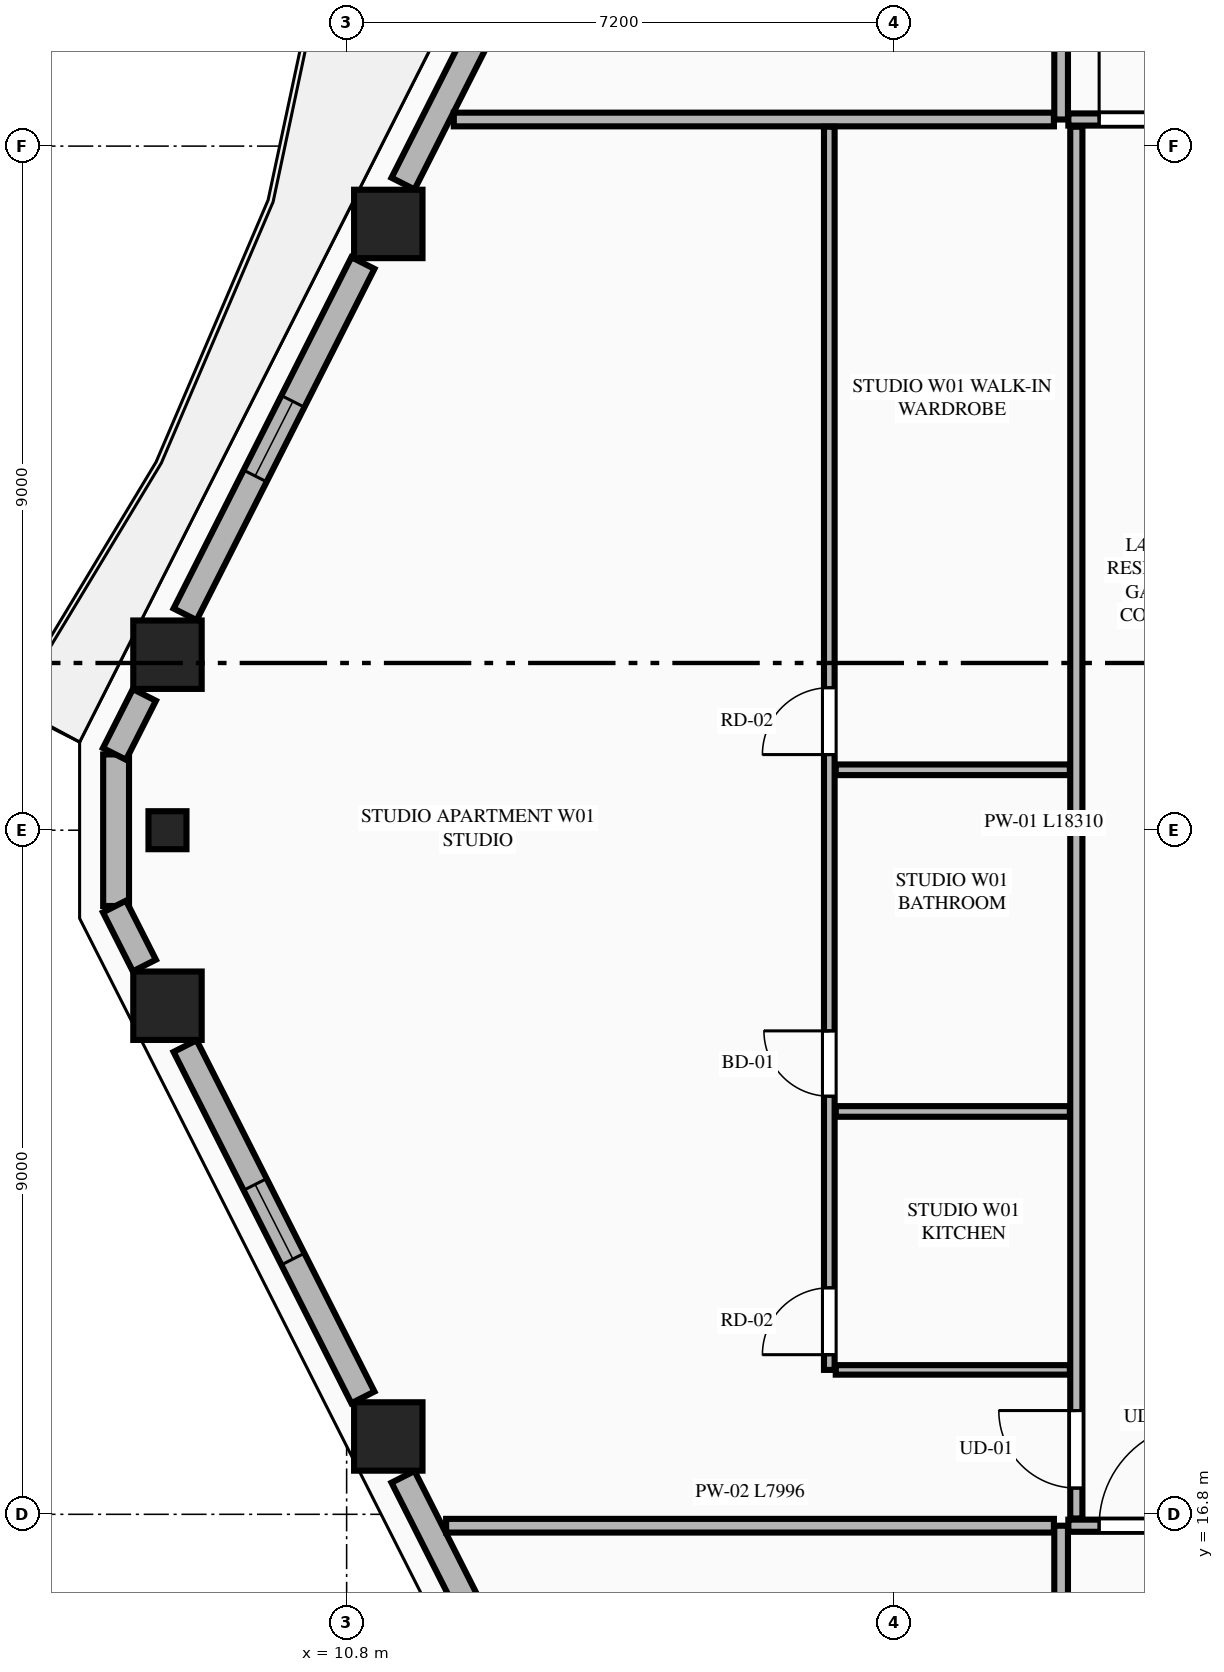
"""IFC4 building model, lengths in metres.
Left out: names, types, materials, properties, quantities, classifications, styles, units other than length and angle.
Written with IfcOpenShell. Run it as: python <this file> out.ifc"""

import sys

from ifc_helpers import new_model, si_unit, direction, frame, frame_2d, origin, origin_2d, place, context, subcontext, project, spatial, rectangle, extrude, element, fill, save


model = new_model("IFC4")
c1 = context("Model", 3, precision=1e-05, world=origin(), true_north=direction((0.0, 1.0)))
c2 = subcontext(c1, "Body", "Model", "MODEL_VIEW")
j1 = project(units=[si_unit("LENGTHUNIT", "METRE"), si_unit("PLANEANGLEUNIT", "RADIAN")], contexts=[c1])
p1 = place(None, origin())
s1 = spatial("IfcSite", under=j1, at=p1, CompositionType="ELEMENT")
p2 = place(p1, origin())
s2 = spatial("IfcBuilding", under=s1, at=p2, CompositionType="ELEMENT")
p3 = place(p2, frame((0.0, 0.0, 164.15)))
s3 = spatial("IfcBuildingStorey", under=s2, at=p3, CompositionType="ELEMENT", Elevation=164.15)
for number, where, z_axis, x_axis in (
    (1, (11.348, 33.776, 0.0), (0.0, 0.0, 1.0), (1.0, 0.0, 0.0)),
    (2, (8.443, 28.109, 0.0), (0.0, 0.0, 1.0), (1.0, 0.0, 0.0)),
    (3, (8.443, 23.491, 0.0), (0.0, 0.0, 1.0), (1.0, 0.0, 0.0)),
    (4, (11.348, 17.824, 0.0), (0.0, 0.0, 1.0), (1.0, 0.0, 0.0)),
):
    element("IfcColumn", number, at=place(p3, frame(where, z_axis=z_axis, x_axis=x_axis)), inside=s3, PredefinedType="COLUMN", context=c2, shape_type="SweptSolid", body=[
        extrude(rectangle(XDim=0.9, YDim=0.9, at=origin_2d()), origin(), (0.0, 0.0, 1.0), 3.55),
    ])
p4 = place(p3, frame((8.443, 25.8, 0.0), z_axis=(0.0, 0.0, 1.0), x_axis=(0.0, -1.0, 0.0)))
e5 = element("IfcColumn", 5, at=p4, inside=s3, PredefinedType="PILASTER", context=c2, shape_type="SweptSolid", body=[
    extrude(rectangle(XDim=0.5, YDim=0.35, at=origin_2d()), origin(), (0.0, 0.0, 1.0), 3.55),
])
p5 = place(p3, frame((7.767, 26.797, 0.0), z_axis=(0.0, 0.0, 1.0), x_axis=(0.0, -1.0, 0.0)))
e6 = element("IfcWall", 6, at=p5, inside=s3, PredefinedType="STANDARD", context=c2, shape_type="SweptSolid", body=[
    extrude(rectangle(XDim=1.994, YDim=0.34, at=frame_2d((0.997, 0.0))), origin(), (0.0, 0.0, 1.0), 3.34),
])
p6 = place(p3, frame((13.982, 39.129, 0.0), z_axis=(0.0, 0.0, 1.0), x_axis=(-0.451491174807, -0.892275584711, 0.0)))
e7 = element("IfcWall", 7, at=p6, inside=s3, PredefinedType="STANDARD", context=c2, shape_type="SweptSolid", body=[
    extrude(rectangle(XDim=5.404, YDim=0.34, at=frame_2d((2.702, 0.0))), origin(), (0.0, 0.0, 1.0), 2.797),
])
p7 = place(p6, frame((1.555, 0.0, 0.0)))
e8 = element("IfcOpeningElement", 8, at=p7, cuts=e7, PredefinedType="OPENING", context=c2, shape_type="SweptSolid", body=[
    extrude(rectangle(XDim=1.1, YDim=2.25, at=frame_2d((0.55, 1.125))), frame((0.0, 0.18, 0.0), z_axis=(0.0, -1.0, 0.0), x_axis=(1.0, 0.0, 0.0)), (0.0, 0.0, 1.0), 0.36),
])
p8 = place(p3, frame((11.014, 33.262, 0.0), z_axis=(0.0, 0.0, 1.0), x_axis=(-0.451506699894, -0.892267728852, 0.0)))
e9 = element("IfcWall", 9, at=p8, inside=s3, PredefinedType="STANDARD", context=c2, shape_type="SweptSolid", body=[
    extrude(rectangle(XDim=5.18, YDim=0.34, at=frame_2d((2.59, 0.0))), origin(), (0.0, 0.0, 1.0), 2.797),
])
p9 = place(p8, frame((2.04, 0.0, 0.75)))
e10 = element("IfcOpeningElement", 10, at=p9, cuts=e9, PredefinedType="OPENING", context=c2, shape_type="SweptSolid", body=[
    extrude(rectangle(XDim=1.1, YDim=1.897, at=frame_2d((0.55, 0.948))), frame((0.0, 0.18, 0.0), z_axis=(0.0, -1.0, 0.0), x_axis=(1.0, 0.0, 0.0)), (0.0, 0.0, 1.0), 0.36),
])
p10 = place(p3, frame((8.139, 27.58, 0.0), z_axis=(0.0, 0.0, 1.0), x_axis=(-0.451586578297, -0.892227304168, 0.0)))
e11 = element("IfcWall", 11, at=p10, inside=s3, PredefinedType="STANDARD", context=c2, shape_type="SweptSolid", body=[
    extrude(rectangle(XDim=0.87, YDim=0.34, at=frame_2d((0.435, 0.0))), origin(), (0.0, 0.0, 1.0), 3.34),
])
p11 = place(p3, frame((7.746, 24.796, 0.0), z_axis=(0.0, 0.0, 1.0), x_axis=(0.451699687084, -0.892170046957, 0.0)))
e12 = element("IfcWall", 12, at=p11, inside=s3, PredefinedType="STANDARD", context=c2, shape_type="SweptSolid", body=[
    extrude(rectangle(XDim=0.87, YDim=0.34, at=frame_2d((0.435, 0.0))), origin(), (0.0, 0.0, 1.0), 3.34),
])
p12 = place(p3, frame((8.675, 22.96, 0.0), z_axis=(0.0, 0.0, 1.0), x_axis=(0.451506699894, -0.892267728852, 0.0)))
e13 = element("IfcWall", 13, at=p12, inside=s3, PredefinedType="STANDARD", context=c2, shape_type="SweptSolid", body=[
    extrude(rectangle(XDim=5.18, YDim=0.34, at=frame_2d((2.59, 0.0))), origin(), (0.0, 0.0, 1.0), 2.797),
])
p13 = place(p12, frame((2.04, 0.0, 0.75)))
e14 = element("IfcOpeningElement", 14, at=p13, cuts=e13, PredefinedType="OPENING", context=c2, shape_type="SweptSolid", body=[
    extrude(rectangle(XDim=1.1, YDim=1.897, at=frame_2d((0.55, 0.948))), frame((0.0, 0.18, 0.0), z_axis=(0.0, -1.0, 0.0), x_axis=(1.0, 0.0, 0.0)), (0.0, 0.0, 1.0), 0.36),
])
p14 = place(p3, frame((11.542, 17.293, 0.0), z_axis=(0.0, 0.0, 1.0), x_axis=(0.451491174807, -0.892275584711, 0.0)))
e15 = element("IfcWall", 15, at=p14, inside=s3, PredefinedType="STANDARD", context=c2, shape_type="SweptSolid", body=[
    extrude(rectangle(XDim=5.404, YDim=0.34, at=frame_2d((2.702, 0.0))), origin(), (0.0, 0.0, 1.0), 2.797),
])
p15 = place(p14, frame((2.152, 0.0, 0.75)))
e16 = element("IfcOpeningElement", 16, at=p15, cuts=e15, PredefinedType="OPENING", context=c2, shape_type="SweptSolid", body=[
    extrude(rectangle(XDim=1.1, YDim=1.897, at=frame_2d((0.55, 0.948))), frame((0.0, 0.18, 0.0), z_axis=(0.0, -1.0, 0.0), x_axis=(1.0, 0.0, 0.0)), (0.0, 0.0, 1.0), 0.36),
])
p16 = place(p3, frame((20.2, 4.105, 0.0), z_axis=(0.0, 0.0, 1.0), x_axis=(0.0, 1.0, 0.0)))
e17 = element("IfcWall", 17, at=p16, inside=s3, PredefinedType="PARTITIONING", context=c2, shape_type="SweptSolid", body=[
    extrude(rectangle(XDim=12.545, YDim=0.18, at=frame_2d((6.272, 0.0))), origin(), (0.0, 0.0, 1.0), 3.34),
])
p17 = place(p3, frame((20.295, 16.65, 0.0), z_axis=(0.0, 0.0, 1.0), x_axis=(1.0, 0.0, 0.0)))
e18 = element("IfcWall", 18, at=p17, inside=s3, PredefinedType="PARTITIONING", context=c2, shape_type="SweptSolid", body=[
    extrude(rectangle(XDim=24.21, YDim=0.16, at=frame_2d((12.105, 0.0))), origin(), (0.0, 0.0, 1.0), 3.34),
])
p18 = place(p17, frame((0.405, 0.0, 0.0)))
e19 = element("IfcOpeningElement", 19, at=p18, cuts=e18, PredefinedType="OPENING", context=c2, shape_type="SweptSolid", body=[
    extrude(rectangle(XDim=1.35, YDim=2.35, at=frame_2d((0.675, 1.175))), frame((0.0, 0.09, 0.0), z_axis=(0.0, -1.0, 0.0), x_axis=(1.0, 0.0, 0.0)), (0.0, 0.0, 1.0), 0.18),
])
p19 = place(p3, frame((20.2, 35.15, 0.0), z_axis=(0.0, 0.0, 1.0), x_axis=(0.0, 1.0, 0.0)))
e20 = element("IfcWall", 20, at=p19, inside=s3, PredefinedType="PARTITIONING", context=c2, shape_type="SweptSolid", body=[
    extrude(rectangle(XDim=12.345, YDim=0.18, at=frame_2d((6.173, 0.0))), origin(), (0.0, 0.0, 1.0), 3.34),
])
p20 = place(p3, frame((20.295, 35.15, 0.0), z_axis=(0.0, 0.0, 1.0), x_axis=(1.0, 0.0, 0.0)))
e21 = element("IfcWall", 21, at=p20, inside=s3, PredefinedType="PARTITIONING", context=c2, shape_type="SweptSolid", body=[
    extrude(rectangle(XDim=24.21, YDim=0.16, at=frame_2d((12.105, 0.0))), origin(), (0.0, 0.0, 1.0), 3.34),
])
p21 = place(p20, frame((0.405, 0.0, 0.0)))
e22 = element("IfcOpeningElement", 22, at=p21, cuts=e21, PredefinedType="OPENING", context=c2, shape_type="SweptSolid", body=[
    extrude(rectangle(XDim=1.35, YDim=2.35, at=frame_2d((0.675, 1.175))), frame((0.0, 0.09, 0.0), z_axis=(0.0, -1.0, 0.0), x_axis=(1.0, 0.0, 0.0)), (0.0, 0.0, 1.0), 0.18),
])
p22 = place(p3, frame((12.109, 16.65, 0.0), z_axis=(0.0, 0.0, 1.0), x_axis=(1.0, 0.0, 0.0)))
e23 = element("IfcWall", 23, at=p22, inside=s3, PredefinedType="PARTITIONING", context=c2, shape_type="SweptSolid", body=[
    extrude(rectangle(XDim=7.996, YDim=0.18, at=frame_2d((3.998, 0.0))), origin(), (0.0, 0.0, 1.0), 3.34),
])
p23 = place(p3, frame((12.21, 35.15, 0.0), z_axis=(0.0, 0.0, 1.0), x_axis=(1.0, 0.0, 0.0)))
e24 = element("IfcWall", 24, at=p23, inside=s3, PredefinedType="PARTITIONING", context=c2, shape_type="SweptSolid", body=[
    extrude(rectangle(XDim=7.895, YDim=0.18, at=frame_2d((3.948, 0.0))), origin(), (0.0, 0.0, 1.0), 3.34),
])
p24 = place(p3, frame((20.4, 16.745, 0.0), z_axis=(0.0, 0.0, 1.0), x_axis=(0.0, 1.0, 0.0)))
e25 = element("IfcWall", 25, at=p24, inside=s3, PredefinedType="PARTITIONING", context=c2, shape_type="SweptSolid", body=[
    extrude(rectangle(XDim=18.31, YDim=0.16, at=frame_2d((9.155, 0.0))), origin(), (0.0, 0.0, 1.0), 3.34),
])
p25 = place(p24, frame((0.4, 0.0, 0.0)))
e26 = element("IfcOpeningElement", 26, at=p25, cuts=e25, PredefinedType="OPENING", context=c2, shape_type="SweptSolid", body=[
    extrude(rectangle(XDim=1.02, YDim=2.25, at=frame_2d((0.51, 1.125))), frame((0.0, 0.09, 0.0), z_axis=(0.0, -1.0, 0.0), x_axis=(1.0, 0.0, 0.0)), (0.0, 0.0, 1.0), 0.18),
])
p26 = place(p3, frame((17.235, 18.7, 0.0), z_axis=(0.0, 0.0, 1.0), x_axis=(1.0, 0.0, 0.0)))
e27 = element("IfcWall", 27, at=p26, inside=s3, PredefinedType="PARTITIONING", context=c2, shape_type="SweptSolid", body=[
    extrude(rectangle(XDim=3.08, YDim=0.125, at=frame_2d((1.54, 0.0))), origin(), (0.0, 0.0, 1.0), 2.722),
])
p27 = place(p3, frame((17.15, 18.7, 0.0), z_axis=(0.0, 0.0, 1.0), x_axis=(0.0, 1.0, 0.0)))
e28 = element("IfcWall", 28, at=p27, inside=s3, PredefinedType="PLUMBINGWALL", context=c2, shape_type="SweptSolid", body=[
    extrude(rectangle(XDim=16.355, YDim=0.14, at=frame_2d((8.177, 0.0))), origin(), (0.0, 0.0, 1.0), 3.34),
])
p28 = place(p27, frame((3.6, 0.0, 0.0)))
e29 = element("IfcOpeningElement", 29, at=p28, cuts=e28, PredefinedType="OPENING", context=c2, shape_type="SweptSolid", body=[
    extrude(rectangle(XDim=0.86, YDim=2.1, at=frame_2d((0.43, 1.05))), frame((0.0, 0.08, 0.0), z_axis=(0.0, -1.0, 0.0), x_axis=(1.0, 0.0, 0.0)), (0.0, 0.0, 1.0), 0.16),
])
p29 = place(p27, frame((8.095, 0.0, 0.0)))
e30 = element("IfcOpeningElement", 30, at=p29, cuts=e28, PredefinedType="OPENING", context=c2, shape_type="SweptSolid", body=[
    extrude(rectangle(XDim=0.88, YDim=2.15, at=frame_2d((0.44, 1.075))), frame((0.0, 0.08, 0.0), z_axis=(0.0, -1.0, 0.0), x_axis=(1.0, 0.0, 0.0)), (0.0, 0.0, 1.0), 0.16),
])
p30 = place(p27, frame((0.2, 0.0, 0.0)))
e31 = element("IfcOpeningElement", 31, at=p30, cuts=e28, PredefinedType="OPENING", context=c2, shape_type="SweptSolid", body=[
    extrude(rectangle(XDim=0.88, YDim=2.15, at=frame_2d((0.44, 1.075))), frame((0.0, 0.08, 0.0), z_axis=(0.0, -1.0, 0.0), x_axis=(1.0, 0.0, 0.0)), (0.0, 0.0, 1.0), 0.16),
])
for number, where, z_axis, x_axis in (
    (32, (17.235, 22.1, 0.0), (0.0, 0.0, 1.0), (1.0, 0.0, 0.0)),
    (33, (17.235, 26.595, 0.0), (0.0, 0.0, 1.0), (1.0, 0.0, 0.0)),
):
    element("IfcWall", number, at=place(p3, frame(where, z_axis=z_axis, x_axis=x_axis)), inside=s3, PredefinedType="PLUMBINGWALL", context=c2, shape_type="SweptSolid", body=[
        extrude(rectangle(XDim=3.08, YDim=0.14, at=frame_2d((1.54, 0.0))), origin(), (0.0, 0.0, 1.0), 3.34),
    ])
p31 = place(p9, origin())
e34 = element("IfcWindow", 34, at=p31, inside=s3, PartitioningType="SINGLE_PANEL", PredefinedType="WINDOW", context=c2, shape_type="SweptSolid", body=[
    extrude(rectangle(XDim=1.1, YDim=1.897, at=frame_2d((0.55, 0.948))), frame((0.0, 0.03, 0.0), z_axis=(0.0, -1.0, 0.0), x_axis=(1.0, 0.0, 0.0)), (0.0, 0.0, 1.0), 0.06),
])
fill(e10, e34)
p32 = place(p13, origin())
e35 = element("IfcWindow", 35, at=p32, inside=s3, PartitioningType="SINGLE_PANEL", PredefinedType="WINDOW", context=c2, shape_type="SweptSolid", body=[
    extrude(rectangle(XDim=1.1, YDim=1.897, at=frame_2d((0.55, 0.948))), frame((0.0, 0.03, 0.0), z_axis=(0.0, -1.0, 0.0), x_axis=(1.0, 0.0, 0.0)), (0.0, 0.0, 1.0), 0.06),
])
fill(e14, e35)
p33 = place(p18, origin())
e36 = element("IfcDoor", 36, at=p33, inside=s3, OperationType="SINGLE_SWING_RIGHT", PredefinedType="DOOR", context=c2, shape_type="SweptSolid", body=[
    extrude(rectangle(XDim=1.35, YDim=2.35, at=frame_2d((0.675, 1.175))), frame((0.0, 0.025, 0.0), z_axis=(0.0, -1.0, 0.0), x_axis=(1.0, 0.0, 0.0)), (0.0, 0.0, 1.0), 0.05),
])
fill(e19, e36)
p34 = place(p21, origin())
e37 = element("IfcDoor", 37, at=p34, inside=s3, OperationType="SINGLE_SWING_LEFT", PredefinedType="DOOR", context=c2, shape_type="SweptSolid", body=[
    extrude(rectangle(XDim=1.35, YDim=2.35, at=frame_2d((0.675, 1.175))), frame((0.0, 0.025, 0.0), z_axis=(0.0, -1.0, 0.0), x_axis=(1.0, 0.0, 0.0)), (0.0, 0.0, 1.0), 0.05),
])
fill(e22, e37)
p35 = place(p28, origin())
e38 = element("IfcDoor", 38, at=p35, inside=s3, OperationType="SINGLE_SWING_RIGHT", PredefinedType="DOOR", context=c2, shape_type="SweptSolid", body=[
    extrude(rectangle(XDim=0.86, YDim=2.1, at=frame_2d((0.43, 1.05))), frame((0.0, 0.025, 0.0), z_axis=(0.0, -1.0, 0.0), x_axis=(1.0, 0.0, 0.0)), (0.0, 0.0, 1.0), 0.05),
])
fill(e29, e38)
p36 = place(p29, origin())
e39 = element("IfcDoor", 39, at=p36, inside=s3, OperationType="SINGLE_SWING_LEFT", PredefinedType="DOOR", context=c2, shape_type="SweptSolid", body=[
    extrude(rectangle(XDim=0.88, YDim=2.15, at=frame_2d((0.44, 1.075))), frame((0.0, 0.025, 0.0), z_axis=(0.0, -1.0, 0.0), x_axis=(1.0, 0.0, 0.0)), (0.0, 0.0, 1.0), 0.05),
])
fill(e30, e39)
p37 = place(p25, origin())
e40 = element("IfcDoor", 40, at=p37, inside=s3, OperationType="SINGLE_SWING_RIGHT", PredefinedType="DOOR", context=c2, shape_type="SweptSolid", body=[
    extrude(rectangle(XDim=1.02, YDim=2.25, at=frame_2d((0.51, 1.125))), frame((0.0, 0.025, 0.0), z_axis=(0.0, -1.0, 0.0), x_axis=(1.0, 0.0, 0.0)), (0.0, 0.0, 1.0), 0.05),
])
fill(e26, e40)
p38 = place(p30, origin())
e41 = element("IfcDoor", 41, at=p38, inside=s3, OperationType="SINGLE_SWING_LEFT", PredefinedType="DOOR", context=c2, shape_type="SweptSolid", body=[
    extrude(rectangle(XDim=0.88, YDim=2.15, at=frame_2d((0.44, 1.075))), frame((0.0, 0.025, 0.0), z_axis=(0.0, -1.0, 0.0), x_axis=(1.0, 0.0, 0.0)), (0.0, 0.0, 1.0), 0.05),
])
fill(e31, e41)
save(model, sys.argv[1])
